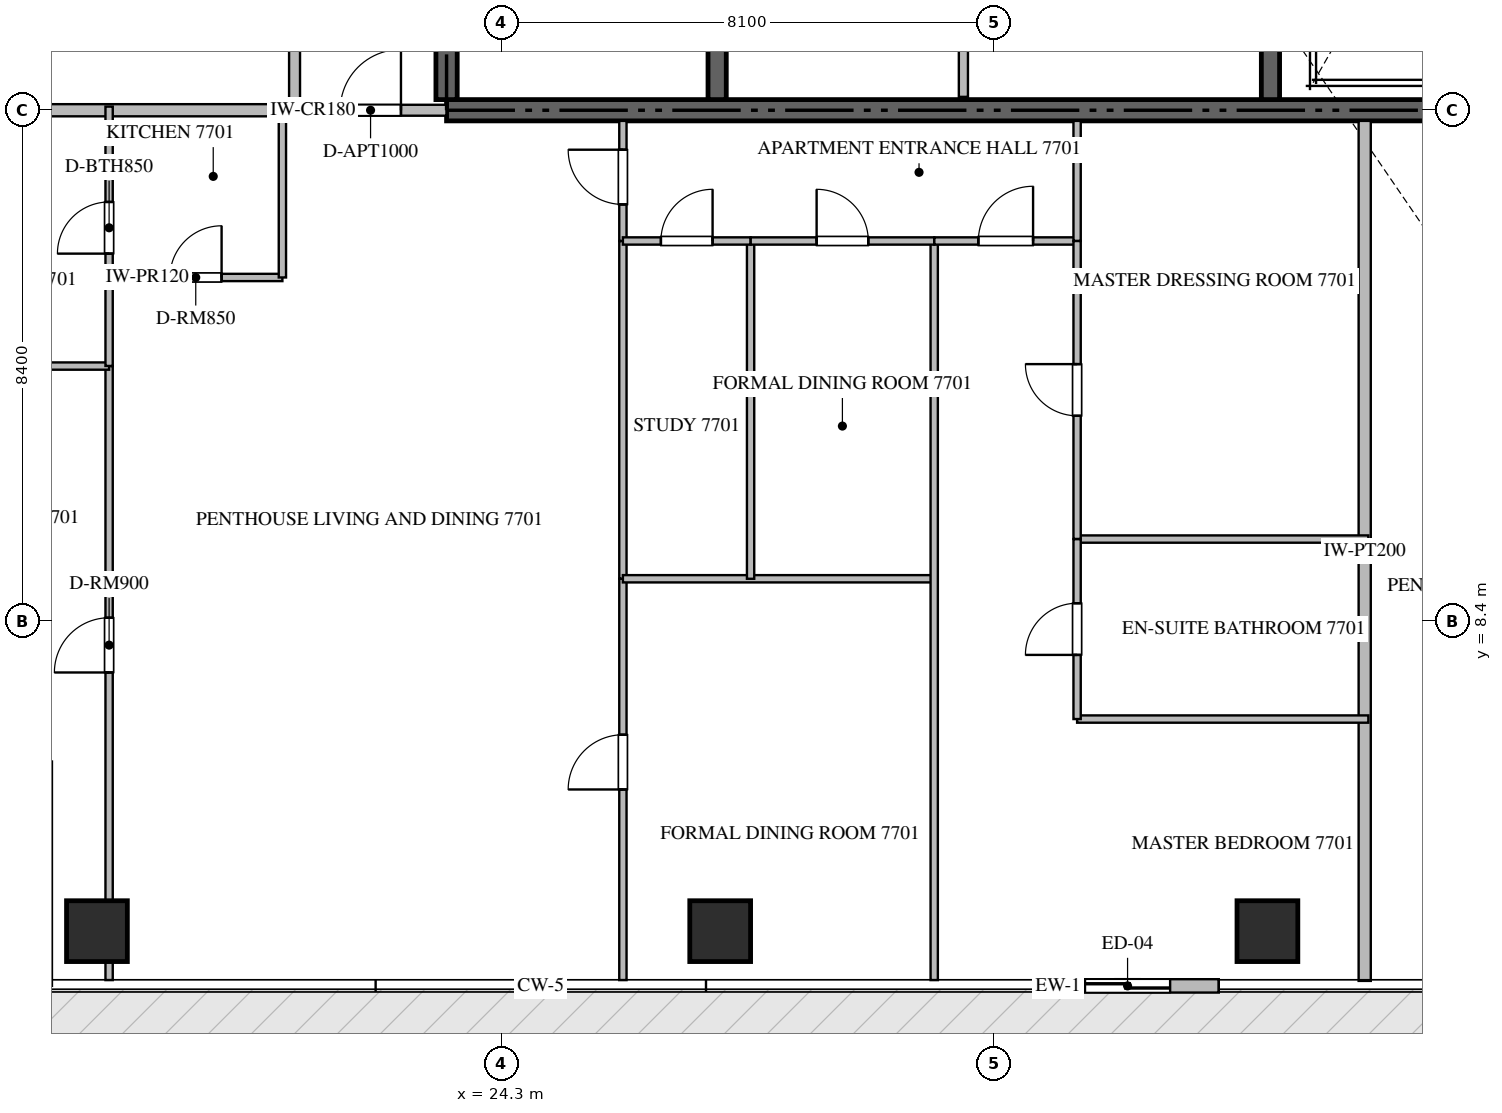
"""IFC4 building model, lengths in metres.
Left out: names, types, materials, properties, quantities, classifications, styles, units other than length and angle.
Written with IfcOpenShell. Run it as: python <this file> out.ifc"""

import sys

from ifc_helpers import new_model, si_unit, direction, frame, frame_2d, origin, origin_2d, place, context, subcontext, project, spatial, rectangle, extrude, source, transform, mapped, element, fill, save


model = new_model("IFC4")
c1 = context("Model", 3, precision=1e-05, world=origin(), true_north=direction((0.0, 1.0)))
c2 = subcontext(c1, "Body", "Model", "MODEL_VIEW")
j1 = project(units=[si_unit("LENGTHUNIT", "METRE"), si_unit("PLANEANGLEUNIT", "RADIAN")], contexts=[c1])
p1 = place(None, origin())
s1 = spatial("IfcSite", under=j1, at=p1, CompositionType="ELEMENT")
p2 = place(p1, origin())
s2 = spatial("IfcBuilding", under=s1, at=p2, CompositionType="ELEMENT")
p3 = place(p2, frame((0.0, 0.0, 309.65)))
s3 = spatial("IfcBuildingStorey", under=s2, at=p3, CompositionType="ELEMENT", Elevation=309.65)
p4 = place(p3, frame((23.4, 16.8, -0.26), z_axis=(0.0, 0.0, 1.0), x_axis=(1.0, 0.0, 0.0)))
e1 = element("IfcWall", 1, at=p4, inside=s3, PredefinedType="SHEAR", context=c2, shape_type="SweptSolid", body=[
    extrude(rectangle(XDim=18.0, YDim=0.35, at=frame_2d((9.0, 0.0))), origin(), (0.0, 0.0, 1.0), 4.048),
])
p5 = place(p3, frame((23.4, 16.975, -0.26), z_axis=(0.0, 0.0, 1.0), x_axis=(0.0, 1.0, 0.0)))
e2 = element("IfcWall", 2, at=p5, inside=s3, PredefinedType="SHEAR", context=c2, shape_type="SweptSolid", body=[
    extrude(rectangle(XDim=4.875, YDim=0.35, at=frame_2d((2.438, 0.0))), origin(), (0.0, 0.0, 1.0), 4.048),
])
p6 = place(p3, frame((27.85, 16.975, -0.26), z_axis=(0.0, 0.0, 1.0), x_axis=(0.0, 1.0, 0.0)))
e3 = element("IfcWall", 3, at=p6, inside=s3, PredefinedType="SHEAR", context=c2, shape_type="SweptSolid", body=[
    extrude(rectangle(XDim=4.875, YDim=0.3, at=frame_2d((2.438, 0.0))), origin(), (0.0, 0.0, 1.0), 4.048),
])
p7 = place(p3, frame((36.95, 16.975, -0.26), z_axis=(0.0, 0.0, 1.0), x_axis=(0.0, 1.0, 0.0)))
e4 = element("IfcWall", 4, at=p7, inside=s3, PredefinedType="SHEAR", context=c2, shape_type="SweptSolid", body=[
    extrude(rectangle(XDim=8.375, YDim=0.3, at=frame_2d((4.188, 0.0))), origin(), (0.0, 0.0, 1.0), 4.048),
])
m1 = source(origin(), c2, "Body", "SweptSolid", [
    extrude(rectangle(XDim=1.0, YDim=1.0, at=origin_2d()), origin(), (0.0, 0.0, 1.0), 4.05),
])
for number, where, z_axis, x_axis in (
    (5, (17.65, 3.3, -0.26), (0.0, 0.0, 1.0), (1.0, 0.0, 0.0)),
    (6, (27.9, 3.3, -0.26), (0.0, 0.0, 1.0), (1.0, 0.0, 0.0)),
    (7, (36.9, 3.3, -0.26), (0.0, 0.0, 1.0), (1.0, 0.0, 0.0)),
):
    element("IfcColumn", number, at=place(p3, frame(where, z_axis=z_axis, x_axis=x_axis)), inside=s3, PredefinedType="COLUMN", context=c2, shape_type="MappedRepresentation", body=[
        mapped(m1, transform((0.0, 0.0, 0.0), scale=1.0)),
    ])
p8 = place(p3, frame((33.1, 2.4, 0.0), z_axis=(0.0, 0.0, 1.0), x_axis=(1.0, 0.0, 0.0)))
e8 = element("IfcWall", 8, at=p8, inside=s3, PredefinedType="ELEMENTEDWALL", context=c2, shape_type="SweptSolid", body=[
    extrude(rectangle(XDim=3.0, YDim=0.22, at=frame_2d((1.5, 0.0))), origin(), (0.0, 0.0, 1.0), 3.775),
])
p9 = place(p8, frame((0.8, 0.0, 0.0)))
e9 = element("IfcOpeningElement", 9, at=p9, cuts=e8, PredefinedType="OPENING", context=c2, shape_type="SweptSolid", body=[
    extrude(rectangle(XDim=1.4, YDim=2.25, at=frame_2d((0.7, 1.125))), frame((0.0, 0.12, 0.0), z_axis=(0.0, -1.0, 0.0), x_axis=(1.0, 0.0, 0.0)), (0.0, 0.0, 1.0), 0.24),
])
p10 = place(p3, frame((16.8, 6.09, 0.0), z_axis=(0.0, 0.0, 1.0), x_axis=(0.0, -1.0, 0.0)))
e10 = element("IfcWall", 10, at=p10, inside=s3, PredefinedType="ELEMENTEDWALL", context=c2, shape_type="SweptSolid", body=[
    extrude(rectangle(XDim=3.69, YDim=0.22, at=frame_2d((1.845, 0.0))), origin(), (0.0, 0.0, 1.0), 3.775),
])
p11 = place(p10, frame((0.447, 0.0, 0.65)))
e11 = element("IfcOpeningElement", 11, at=p11, cuts=e10, PredefinedType="OPENING", context=c2, shape_type="SweptSolid", body=[
    extrude(rectangle(XDim=2.2, YDim=2.4, at=frame_2d((1.1, 1.2))), frame((0.0, 0.12, 0.0), z_axis=(0.0, -1.0, 0.0), x_axis=(1.0, 0.0, 0.0)), (0.0, 0.0, 1.0), 0.24),
])
p12 = place(p3, frame((31.9, 17.02, 0.0), z_axis=(0.0, 0.0, 1.0), x_axis=(0.0, 1.0, 0.0)))
e12 = element("IfcWall", 12, at=p12, inside=s3, PredefinedType="PARTITIONING", context=c2, shape_type="SweptSolid", body=[
    extrude(rectangle(XDim=2.73, YDim=0.15, at=frame_2d((1.365, 0.0))), origin(), (0.0, 0.0, 1.0), 3.79),
])
p13 = place(p3, frame((38.5, 2.482, 0.0), z_axis=(0.0, 0.0, 1.0), x_axis=(0.0, 1.0, 0.0)))
e13 = element("IfcWall", 13, at=p13, inside=s3, PredefinedType="PARTITIONING", context=c2, shape_type="SweptSolid", body=[
    extrude(rectangle(XDim=14.143, YDim=0.2, at=frame_2d((7.072, 0.0))), origin(), (0.0, 0.0, 1.0), 3.79),
])
p14 = place(p3, frame((9.282, 16.8, 0.0), z_axis=(0.0, 0.0, 1.0), x_axis=(1.0, 0.0, 0.0)))
e14 = element("IfcWall", 14, at=p14, inside=s3, PredefinedType="PARTITIONING", context=c2, shape_type="SweptSolid", body=[
    extrude(rectangle(XDim=11.618, YDim=0.2, at=frame_2d((5.809, 0.0))), origin(), (0.0, 0.0, 1.0), 3.79),
])
p15 = place(p3, frame((20.902, 16.8, 0.0), z_axis=(0.0, 0.0, 1.0), x_axis=(1.0, 0.0, 0.0)))
e15 = element("IfcWall", 15, at=p15, inside=s3, PredefinedType="PARTITIONING", context=c2, shape_type="SweptSolid", body=[
    extrude(rectangle(XDim=2.496, YDim=0.18, at=frame_2d((1.248, 0.0))), origin(), (0.0, 0.0, 1.0), 3.79),
])
p16 = place(p15, frame((0.748, 0.0, 0.0)))
e16 = element("IfcOpeningElement", 16, at=p16, cuts=e15, PredefinedType="OPENING", context=c2, shape_type="SweptSolid", body=[
    extrude(rectangle(XDim=1.0, YDim=2.15, at=frame_2d((0.5, 1.075))), frame((0.0, 0.1, 0.0), z_axis=(0.0, -1.0, 0.0), x_axis=(1.0, 0.0, 0.0)), (0.0, 0.0, 1.0), 0.2),
])
p17 = place(p3, frame((20.9, 16.8, 0.0), z_axis=(0.0, 0.0, 1.0), x_axis=(0.0, 1.0, 0.0)))
e17 = element("IfcWall", 17, at=p17, inside=s3, PredefinedType="PARTITIONING", context=c2, shape_type="SweptSolid", body=[
    extrude(rectangle(XDim=16.8, YDim=0.18, at=frame_2d((8.4, 0.0))), origin(), (0.0, 0.0, 1.0), 3.79),
])
p18 = place(p17, frame((1.3, 0.0, 0.0)))
e18 = element("IfcOpeningElement", 18, at=p18, cuts=e17, PredefinedType="OPENING", context=c2, shape_type="SweptSolid", body=[
    extrude(rectangle(XDim=1.0, YDim=2.15, at=frame_2d((0.5, 1.075))), frame((0.0, 0.1, 0.0), z_axis=(0.0, -1.0, 0.0), x_axis=(1.0, 0.0, 0.0)), (0.0, 0.0, 1.0), 0.2),
])
p19 = place(p3, frame((17.85, 14.05, 0.0), z_axis=(0.0, 0.0, 1.0), x_axis=(1.0, 0.0, 0.0)))
e19 = element("IfcWall", 19, at=p19, inside=s3, PredefinedType="PARTITIONING", context=c2, shape_type="SweptSolid", body=[
    extrude(rectangle(XDim=2.85, YDim=0.12, at=frame_2d((1.425, 0.0))), origin(), (0.0, 0.0, 1.0), 3.492),
])
p20 = place(p19, frame((1.0, 0.0, 0.0)))
e20 = element("IfcOpeningElement", 20, at=p20, cuts=e19, PredefinedType="OPENING", context=c2, shape_type="SweptSolid", body=[
    extrude(rectangle(XDim=0.85, YDim=2.1, at=frame_2d((0.425, 1.05))), frame((0.0, 0.07, 0.0), z_axis=(0.0, -1.0, 0.0), x_axis=(1.0, 0.0, 0.0)), (0.0, 0.0, 1.0), 0.14),
])
p21 = place(p3, frame((20.7, 14.05, 0.0), z_axis=(0.0, 0.0, 1.0), x_axis=(0.0, 1.0, 0.0)))
e21 = element("IfcWall", 21, at=p21, inside=s3, PredefinedType="PARTITIONING", context=c2, shape_type="SweptSolid", body=[
    extrude(rectangle(XDim=2.81, YDim=0.12, at=frame_2d((1.405, 0.0))), origin(), (0.0, 0.0, 1.0), 3.79),
])
p22 = place(p3, frame((17.85, 2.495, 0.0), z_axis=(0.0, 0.0, 1.0), x_axis=(0.0, 1.0, 0.0)))
e22 = element("IfcWall", 22, at=p22, inside=s3, PredefinedType="PARTITIONING", context=c2, shape_type="SweptSolid", body=[
    extrude(rectangle(XDim=10.098, YDim=0.12, at=frame_2d((5.049, 0.0))), origin(), (0.0, 0.0, 1.0), 3.292),
])
p23 = place(p22, frame((5.059, 0.0, 0.0)))
e23 = element("IfcOpeningElement", 23, at=p23, cuts=e22, PredefinedType="OPENING", context=c2, shape_type="SweptSolid", body=[
    extrude(rectangle(XDim=0.9, YDim=2.1, at=frame_2d((0.45, 1.05))), frame((0.0, 0.07, 0.0), z_axis=(0.0, -1.0, 0.0), x_axis=(1.0, 0.0, 0.0)), (0.0, 0.0, 1.0), 0.14),
])
p24 = place(p3, frame((14.752, 12.593, 0.0), z_axis=(0.0, 0.0, 1.0), x_axis=(1.0, 0.0, 0.0)))
e24 = element("IfcWall", 24, at=p24, inside=s3, PredefinedType="PARTITIONING", context=c2, shape_type="SweptSolid", body=[
    extrude(rectangle(XDim=3.098, YDim=0.12, at=frame_2d((1.549, 0.0))), origin(), (0.0, 0.0, 1.0), 3.79),
])
p25 = place(p3, frame((17.85, 12.595, 0.0), z_axis=(0.0, 0.0, 1.0), x_axis=(0.0, 1.0, 0.0)))
e25 = element("IfcWall", 25, at=p25, inside=s3, PredefinedType="PARTITIONING", context=c2, shape_type="SweptSolid", body=[
    extrude(rectangle(XDim=4.265, YDim=0.12, at=frame_2d((2.133, 0.0))), origin(), (0.0, 0.0, 1.0), 3.372),
])
p26 = place(p25, frame((1.847, 0.0, 0.0)))
e26 = element("IfcOpeningElement", 26, at=p26, cuts=e25, PredefinedType="OPENING", context=c2, shape_type="SweptSolid", body=[
    extrude(rectangle(XDim=0.85, YDim=2.1, at=frame_2d((0.425, 1.05))), frame((0.0, 0.07, 0.0), z_axis=(0.0, -1.0, 0.0), x_axis=(1.0, 0.0, 0.0)), (0.0, 0.0, 1.0), 0.14),
])
p27 = place(p3, frame((26.3, 14.65, 0.0), z_axis=(0.0, 0.0, 1.0), x_axis=(0.0, 1.0, 0.0)))
e27 = element("IfcWall", 27, at=p27, inside=s3, PredefinedType="PARTITIONING", context=c2, shape_type="SweptSolid", body=[
    extrude(rectangle(XDim=1.975, YDim=0.12, at=frame_2d((0.988, 0.0))), origin(), (0.0, 0.0, 1.0), 3.79),
])
p28 = place(p27, frame((0.601, 0.0, 0.0)))
e28 = element("IfcOpeningElement", 28, at=p28, cuts=e27, PredefinedType="OPENING", context=c2, shape_type="SweptSolid", body=[
    extrude(rectangle(XDim=0.9, YDim=2.1, at=frame_2d((0.45, 1.05))), frame((0.0, 0.07, 0.0), z_axis=(0.0, -1.0, 0.0), x_axis=(1.0, 0.0, 0.0)), (0.0, 0.0, 1.0), 0.14),
])
p29 = place(p3, frame((26.3, 2.495, 0.0), z_axis=(0.0, 0.0, 1.0), x_axis=(0.0, 1.0, 0.0)))
e29 = element("IfcWall", 29, at=p29, inside=s3, PredefinedType="PARTITIONING", context=c2, shape_type="SweptSolid", body=[
    extrude(rectangle(XDim=6.6, YDim=0.12, at=frame_2d((3.3, 0.0))), origin(), (0.0, 0.0, 1.0), 3.79),
])
p30 = place(p29, frame((3.135, 0.0, 0.0)))
e30 = element("IfcOpeningElement", 30, at=p30, cuts=e29, PredefinedType="OPENING", context=c2, shape_type="SweptSolid", body=[
    extrude(rectangle(XDim=0.9, YDim=2.1, at=frame_2d((0.45, 1.05))), frame((0.0, 0.07, 0.0), z_axis=(0.0, -1.0, 0.0), x_axis=(1.0, 0.0, 0.0)), (0.0, 0.0, 1.0), 0.14),
])
p31 = place(p3, frame((26.3, 9.097, 0.0), z_axis=(0.0, 0.0, 1.0), x_axis=(0.0, 1.0, 0.0)))
e31 = element("IfcWall", 31, at=p31, inside=s3, PredefinedType="PARTITIONING", context=c2, shape_type="SweptSolid", body=[
    extrude(rectangle(XDim=5.551, YDim=0.12, at=frame_2d((2.775, 0.0))), origin(), (0.0, 0.0, 1.0), 3.79),
])
p32 = place(p3, frame((26.3, 9.095, 0.0), z_axis=(0.0, 0.0, 1.0), x_axis=(1.0, 0.0, 0.0)))
e32 = element("IfcWall", 32, at=p32, inside=s3, PredefinedType="PARTITIONING", context=c2, shape_type="SweptSolid", body=[
    extrude(rectangle(XDim=5.12, YDim=0.12, at=frame_2d((2.56, 0.0))), origin(), (0.0, 0.0, 1.0), 3.79),
])
p33 = place(p3, frame((31.42, 2.495, 0.0), z_axis=(0.0, 0.0, 1.0), x_axis=(0.0, 1.0, 0.0)))
e33 = element("IfcWall", 33, at=p33, inside=s3, PredefinedType="PARTITIONING", context=c2, shape_type="SweptSolid", body=[
    extrude(rectangle(XDim=12.155, YDim=0.12, at=frame_2d((6.077, 0.0))), origin(), (0.0, 0.0, 1.0), 3.79),
])
p34 = place(p3, frame((28.4, 9.095, 0.0), z_axis=(0.0, 0.0, 1.0), x_axis=(0.0, 1.0, 0.0)))
e34 = element("IfcWall", 34, at=p34, inside=s3, PredefinedType="PARTITIONING", context=c2, shape_type="SweptSolid", body=[
    extrude(rectangle(XDim=5.555, YDim=0.12, at=frame_2d((2.777, 0.0))), origin(), (0.0, 0.0, 1.0), 3.79),
])
p35 = place(p3, frame((26.3, 14.65, 0.0), z_axis=(0.0, 0.0, 1.0), x_axis=(1.0, 0.0, 0.0)))
e35 = element("IfcWall", 35, at=p35, inside=s3, PredefinedType="PARTITIONING", context=c2, shape_type="SweptSolid", body=[
    extrude(rectangle(XDim=2.1, YDim=0.12, at=frame_2d((1.05, 0.0))), origin(), (0.0, 0.0, 1.0), 3.79),
])
p36 = place(p35, frame((0.625, 0.0, 0.0)))
e36 = element("IfcOpeningElement", 36, at=p36, cuts=e35, PredefinedType="OPENING", context=c2, shape_type="SweptSolid", body=[
    extrude(rectangle(XDim=0.85, YDim=2.1, at=frame_2d((0.425, 1.05))), frame((0.0, 0.07, 0.0), z_axis=(0.0, -1.0, 0.0), x_axis=(1.0, 0.0, 0.0)), (0.0, 0.0, 1.0), 0.14),
])
p37 = place(p3, frame((28.402, 14.65, 0.0), z_axis=(0.0, 0.0, 1.0), x_axis=(1.0, 0.0, 0.0)))
e37 = element("IfcWall", 37, at=p37, inside=s3, PredefinedType="PARTITIONING", context=c2, shape_type="SweptSolid", body=[
    extrude(rectangle(XDim=3.018, YDim=0.12, at=frame_2d((1.509, 0.0))), origin(), (0.0, 0.0, 1.0), 3.79),
])
p38 = place(p37, frame((1.084, 0.0, 0.0)))
e38 = element("IfcOpeningElement", 38, at=p38, cuts=e37, PredefinedType="OPENING", context=c2, shape_type="SweptSolid", body=[
    extrude(rectangle(XDim=0.85, YDim=2.1, at=frame_2d((0.425, 1.05))), frame((0.0, 0.07, 0.0), z_axis=(0.0, -1.0, 0.0), x_axis=(1.0, 0.0, 0.0)), (0.0, 0.0, 1.0), 0.14),
])
p39 = place(p3, frame((31.422, 14.65, 0.0), z_axis=(0.0, 0.0, 1.0), x_axis=(1.0, 0.0, 0.0)))
e39 = element("IfcWall", 39, at=p39, inside=s3, PredefinedType="PARTITIONING", context=c2, shape_type="SweptSolid", body=[
    extrude(rectangle(XDim=2.348, YDim=0.12, at=frame_2d((1.174, 0.0))), origin(), (0.0, 0.0, 1.0), 3.79),
])
p40 = place(p39, frame((0.724, 0.0, 0.0)))
e40 = element("IfcOpeningElement", 40, at=p40, cuts=e39, PredefinedType="OPENING", context=c2, shape_type="SweptSolid", body=[
    extrude(rectangle(XDim=0.9, YDim=2.1, at=frame_2d((0.45, 1.05))), frame((0.0, 0.07, 0.0), z_axis=(0.0, -1.0, 0.0), x_axis=(1.0, 0.0, 0.0)), (0.0, 0.0, 1.0), 0.14),
])
for number, where, z_axis, x_axis in (
    (41, (33.77, 6.788, 0.0), (0.0, 0.0, 1.0), (1.0, 0.0, 0.0)),
    (42, (33.77, 9.748, 0.0), (0.0, 0.0, 1.0), (1.0, 0.0, 0.0)),
):
    element("IfcWall", number, at=place(p3, frame(where, z_axis=z_axis, x_axis=x_axis)), inside=s3, PredefinedType="PARTITIONING", context=c2, shape_type="SweptSolid", body=[
        extrude(rectangle(XDim=4.79, YDim=0.12, at=frame_2d((2.395, 0.0))), origin(), (0.0, 0.0, 1.0), 3.79),
    ])
p41 = place(p3, frame((33.77, 6.788, 0.0), z_axis=(0.0, 0.0, 1.0), x_axis=(0.0, 1.0, 0.0)))
e43 = element("IfcWall", 43, at=p41, inside=s3, PredefinedType="PARTITIONING", context=c2, shape_type="SweptSolid", body=[
    extrude(rectangle(XDim=2.96, YDim=0.12, at=frame_2d((1.48, 0.0))), origin(), (0.0, 0.0, 1.0), 3.79),
])
p42 = place(p41, frame((1.055, 0.0, 0.0)))
e44 = element("IfcOpeningElement", 44, at=p42, cuts=e43, PredefinedType="OPENING", context=c2, shape_type="SweptSolid", body=[
    extrude(rectangle(XDim=0.85, YDim=2.1, at=frame_2d((0.425, 1.05))), frame((0.0, 0.07, 0.0), z_axis=(0.0, -1.0, 0.0), x_axis=(1.0, 0.0, 0.0)), (0.0, 0.0, 1.0), 0.14),
])
p43 = place(p3, frame((33.77, 9.75, 0.0), z_axis=(0.0, 0.0, 1.0), x_axis=(0.0, 1.0, 0.0)))
e45 = element("IfcWall", 45, at=p43, inside=s3, PredefinedType="PARTITIONING", context=c2, shape_type="SweptSolid", body=[
    extrude(rectangle(XDim=4.9, YDim=0.12, at=frame_2d((2.45, 0.0))), origin(), (0.0, 0.0, 1.0), 3.79),
])
p44 = place(p43, frame((2.025, 0.0, 0.0)))
e46 = element("IfcOpeningElement", 46, at=p44, cuts=e45, PredefinedType="OPENING", context=c2, shape_type="SweptSolid", body=[
    extrude(rectangle(XDim=0.85, YDim=2.1, at=frame_2d((0.425, 1.05))), frame((0.0, 0.07, 0.0), z_axis=(0.0, -1.0, 0.0), x_axis=(1.0, 0.0, 0.0)), (0.0, 0.0, 1.0), 0.14),
])
p45 = place(p3, frame((33.77, 14.652, 0.0), z_axis=(0.0, 0.0, 1.0), x_axis=(0.0, 1.0, 0.0)))
e47 = element("IfcWall", 47, at=p45, inside=s3, PredefinedType="PARTITIONING", context=c2, shape_type="SweptSolid", body=[
    extrude(rectangle(XDim=1.973, YDim=0.12, at=frame_2d((0.986, 0.0))), origin(), (0.0, 0.0, 1.0), 3.79),
])
m2 = source(origin(), c2, "Body", "SweptSolid", [
    extrude(rectangle(XDim=1.4, YDim=2.25, at=frame_2d((0.7, 1.125))), frame((0.0, 0.025, 0.0), z_axis=(0.0, -1.0, 0.0), x_axis=(1.0, 0.0, 0.0)), (0.0, 0.0, 1.0), 0.05),
])
p46 = place(p9, origin())
e48 = element("IfcDoor", 48, at=p46, inside=s3, OperationType="SLIDING_TO_LEFT", PredefinedType="DOOR", context=c2, shape_type="MappedRepresentation", body=[
    mapped(m2, transform((0.0, 0.0, 0.0), scale=1.0)),
])
fill(e9, e48)
m3 = source(origin(), c2, "Body", "SweptSolid", [
    extrude(rectangle(XDim=1.0, YDim=2.15, at=frame_2d((0.5, 1.075))), frame((0.0, 0.025, 0.0), z_axis=(0.0, -1.0, 0.0), x_axis=(1.0, 0.0, 0.0)), (0.0, 0.0, 1.0), 0.05),
])
p47 = place(p16, origin())
e49 = element("IfcDoor", 49, at=p47, inside=s3, OperationType="SINGLE_SWING_RIGHT", PredefinedType="DOOR", context=c2, shape_type="MappedRepresentation", body=[
    mapped(m3, transform((0.0, 0.0, 0.0), scale=1.0)),
])
fill(e16, e49)
m4 = source(origin(), c2, "Body", "SweptSolid", [
    extrude(rectangle(XDim=0.85, YDim=2.1, at=frame_2d((0.425, 1.05))), frame((0.0, 0.025, 0.0), z_axis=(0.0, -1.0, 0.0), x_axis=(1.0, 0.0, 0.0)), (0.0, 0.0, 1.0), 0.05),
])
p48 = place(p20, origin())
e50 = element("IfcDoor", 50, at=p48, inside=s3, OperationType="SINGLE_SWING_RIGHT", PredefinedType="DOOR", context=c2, shape_type="MappedRepresentation", body=[
    mapped(m4, transform((0.0, 0.0, 0.0), scale=1.0)),
])
fill(e20, e50)
m5 = source(origin(), c2, "Body", "SweptSolid", [
    extrude(rectangle(XDim=0.9, YDim=2.1, at=frame_2d((0.45, 1.05))), frame((0.0, 0.025, 0.0), z_axis=(0.0, -1.0, 0.0), x_axis=(1.0, 0.0, 0.0)), (0.0, 0.0, 1.0), 0.05),
])
p49 = place(p23, origin())
e51 = element("IfcDoor", 51, at=p49, inside=s3, OperationType="SINGLE_SWING_LEFT", PredefinedType="DOOR", context=c2, shape_type="MappedRepresentation", body=[
    mapped(m5, transform((0.0, 0.0, 0.0), scale=1.0)),
])
fill(e23, e51)
p50 = place(p26, origin())
e52 = element("IfcDoor", 52, at=p50, inside=s3, OperationType="SINGLE_SWING_LEFT", PredefinedType="DOOR", context=c2, shape_type="MappedRepresentation", body=[
    mapped(m4, transform((0.0, 0.0, 0.0), scale=1.0)),
])
fill(e26, e52)
p51 = place(p28, origin())
e53 = element("IfcDoor", 53, at=p51, inside=s3, OperationType="SINGLE_SWING_RIGHT", PredefinedType="DOOR", context=c2, shape_type="MappedRepresentation", body=[
    mapped(m5, transform((0.0, 0.0, 0.0), scale=1.0)),
])
fill(e28, e53)
p52 = place(p30, origin())
e54 = element("IfcDoor", 54, at=p52, inside=s3, OperationType="SINGLE_SWING_LEFT", PredefinedType="DOOR", context=c2, shape_type="MappedRepresentation", body=[
    mapped(m5, transform((0.0, 0.0, 0.0), scale=1.0)),
])
fill(e30, e54)
p53 = place(p36, origin())
e55 = element("IfcDoor", 55, at=p53, inside=s3, OperationType="SINGLE_SWING_RIGHT", PredefinedType="DOOR", context=c2, shape_type="MappedRepresentation", body=[
    mapped(m4, transform((0.0, 0.0, 0.0), scale=1.0)),
])
fill(e36, e55)
p54 = place(p38, origin())
e56 = element("IfcDoor", 56, at=p54, inside=s3, OperationType="SINGLE_SWING_LEFT", PredefinedType="DOOR", context=c2, shape_type="MappedRepresentation", body=[
    mapped(m4, transform((0.0, 0.0, 0.0), scale=1.0)),
])
fill(e38, e56)
p55 = place(p40, origin())
e57 = element("IfcDoor", 57, at=p55, inside=s3, OperationType="SINGLE_SWING_RIGHT", PredefinedType="DOOR", context=c2, shape_type="MappedRepresentation", body=[
    mapped(m5, transform((0.0, 0.0, 0.0), scale=1.0)),
])
fill(e40, e57)
p56 = place(p42, origin())
e58 = element("IfcDoor", 58, at=p56, inside=s3, OperationType="SINGLE_SWING_LEFT", PredefinedType="DOOR", context=c2, shape_type="MappedRepresentation", body=[
    mapped(m4, transform((0.0, 0.0, 0.0), scale=1.0)),
])
fill(e44, e58)
p57 = place(p44, origin())
e59 = element("IfcDoor", 59, at=p57, inside=s3, OperationType="SINGLE_SWING_RIGHT", PredefinedType="DOOR", context=c2, shape_type="MappedRepresentation", body=[
    mapped(m4, transform((0.0, 0.0, 0.0), scale=1.0)),
])
fill(e46, e59)
save(model, sys.argv[1])
